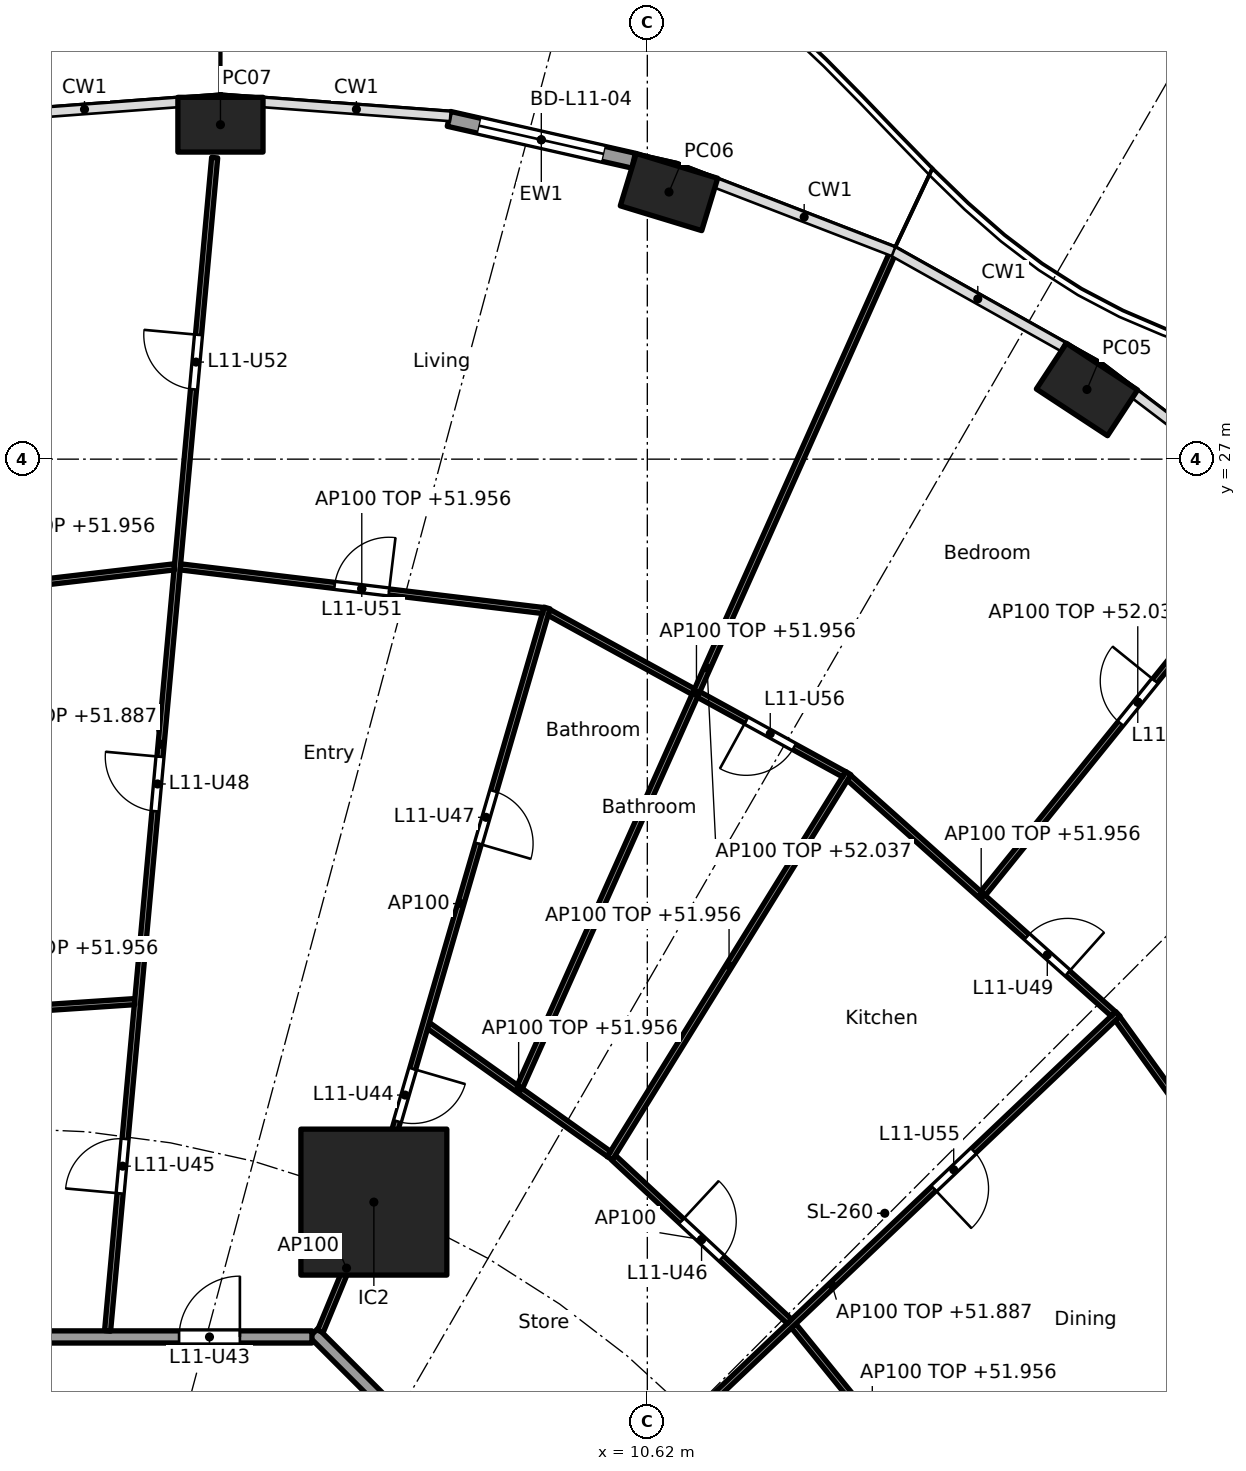
"""IFC4 building model, lengths in metres.
Left out: names, types, materials, properties, quantities, classifications, styles, units other than length and angle.
Written with IfcOpenShell. Run it as: python <this file> out.ifc"""

import sys

from ifc_helpers import new_model, si_unit, direction, frame, frame_2d, origin, origin_2d, place, context, subcontext, project, spatial, rectangle, hollow_rectangle, extrude, element, fill, save


model = new_model("IFC4")
c1 = context("Model", 3, precision=1e-05, world=origin(), true_north=direction((0.0, 1.0)))
c2 = subcontext(c1, "Body", "Model", "MODEL_VIEW")
j1 = project(units=[si_unit("LENGTHUNIT", "METRE"), si_unit("PLANEANGLEUNIT", "RADIAN")], contexts=[c1])
p1 = place(None, origin())
s1 = spatial("IfcSite", under=j1, at=p1, CompositionType="ELEMENT")
p2 = place(p1, origin())
s2 = spatial("IfcBuilding", under=s1, at=p2, CompositionType="ELEMENT")
p3 = place(p2, frame((0.0, 0.0, 49.2)))
s3 = spatial("IfcBuildingStorey", under=s2, at=p3, CompositionType="ELEMENT", Elevation=49.2)
for number, where, z_axis, x_axis in (
    (1, (17.85, 28.146, 0.0), (0.0, 0.0, 1.0), (-0.836, 0.549, 0.0)),
    (2, (10.976, 31.393, 0.0), (0.0, 0.0, 1.0), (-0.957, 0.292, 0.0)),
    (3, (3.6, 32.5, 0.0), (0.0, 0.0, 1.0), (-1.0, 0.0, 0.0)),
):
    element("IfcColumn", number, at=place(p3, frame(where, z_axis=z_axis, x_axis=x_axis)), inside=s3, PredefinedType="COLUMN", context=c2, shape_type="SweptSolid", body=[
        extrude(hollow_rectangle(XDim=1.4, YDim=0.9, WallThickness=0.05, at=origin_2d()), origin(), (0.0, 0.0, 1.0), 3.7),
    ])
p4 = place(p3, frame((6.123, 14.782, 0.0), z_axis=(0.0, 0.0, 1.0), x_axis=(1.0, 0.0, 0.0)))
e4 = element("IfcColumn", 4, at=p4, inside=s3, PredefinedType="COLUMN", context=c2, shape_type="SweptSolid", body=[
    extrude(rectangle(XDim=2.4, YDim=2.4, at=origin_2d()), origin(), (0.0, 0.0, 1.0), 3.7),
])
p5 = place(p3, frame((7.358, 32.596, 0.0), z_axis=(0.0, 0.0, 1.0), x_axis=(0.97533495413, -0.220729987208, 0.0)))
e5 = element("IfcWall", 5, at=p5, inside=s3, PredefinedType="SOLIDWALL", context=c2, shape_type="SweptSolid", body=[
    extrude(rectangle(XDim=3.115, YDim=0.25, at=frame_2d((1.557, 0.0))), origin(), (0.0, 0.0, 1.0), 3.44),
])
p6 = place(p5, frame((0.507, 0.0, 0.0)))
e6 = element("IfcOpeningElement", 6, at=p6, cuts=e5, PredefinedType="OPENING", context=c2, shape_type="SweptSolid", body=[
    extrude(rectangle(XDim=2.1, YDim=2.4, at=frame_2d((1.05, 1.2))), frame((0.0, 0.135, 0.0), z_axis=(0.0, -1.0, 0.0), x_axis=(1.0, 0.0, 0.0)), (0.0, 0.0, 1.0), 0.27),
])
p7 = place(p3, frame((12.635, 5.134, 0.0), z_axis=(0.0, 0.0, 1.0), x_axis=(-0.707106781187, 0.707106781187, 0.0)))
e7 = element("IfcWall", 7, at=p7, inside=s3, PredefinedType="PARTITIONING", context=c2, shape_type="SweptSolid", body=[
    extrude(rectangle(XDim=10.609, YDim=0.2, at=frame_2d((5.305, 0.0))), origin(), (0.0, 0.0, 1.0), 3.44),
])
p8 = place(p3, frame((5.104, 12.565, 0.0), z_axis=(0.0, 0.0, 1.0), x_axis=(-1.0, 0.0, 0.0)))
e8 = element("IfcWall", 8, at=p8, inside=s3, PredefinedType="PARTITIONING", context=c2, shape_type="SweptSolid", body=[
    extrude(rectangle(XDim=10.409, YDim=0.2, at=frame_2d((5.205, 0.0))), origin(), (0.0, 0.0, 1.0), 3.44),
])
p9 = place(p8, frame((1.185, 0.0, 0.0)))
e9 = element("IfcOpeningElement", 9, at=p9, cuts=e8, PredefinedType="OPENING", context=c2, shape_type="SweptSolid", body=[
    extrude(rectangle(XDim=1.0, YDim=2.1, at=frame_2d((0.5, 1.05))), frame((0.0, 0.11, 0.0), z_axis=(0.0, -1.0, 0.0), x_axis=(1.0, 0.0, 0.0)), (0.0, 0.0, 1.0), 0.22),
])
p10 = place(p3, frame((15.614, 9.559, 0.0), z_axis=(0.0, 0.0, 1.0), x_axis=(-0.63012473344, 0.776493928056, 0.0)))
e10 = element("IfcWall", 10, at=p10, inside=s3, PredefinedType="PARTITIONING", context=c2, shape_type="SweptSolid", body=[
    extrude(rectangle(XDim=4.106, YDim=0.1, at=frame_2d((2.053, 0.0))), origin(), (0.0, 0.0, 1.0), 2.756),
])
p11 = place(p3, frame((21.908, 12.866, 0.0), z_axis=(0.0, 0.0, 1.0), x_axis=(-0.584558392935, 0.811351640936, 0.0)))
e11 = element("IfcWall", 11, at=p11, inside=s3, PredefinedType="PARTITIONING", context=c2, shape_type="SweptSolid", body=[
    extrude(rectangle(XDim=6.084, YDim=0.1, at=frame_2d((3.042, 0.0))), origin(), (0.0, 0.0, 1.0), 2.756),
])
p12 = place(p3, frame((8.957, 8.953, 0.0), z_axis=(0.0, 0.0, 1.0), x_axis=(0.725250022034, 0.688485588476, 0.0)))
e12 = element("IfcWall", 12, at=p12, inside=s3, PredefinedType="PARTITIONING", context=c2, shape_type="SweptSolid", body=[
    extrude(rectangle(XDim=12.963, YDim=0.1, at=frame_2d((6.481, 0.0))), origin(), (0.0, 0.0, 1.0), 2.687),
])
p13 = place(p12, frame((2.333, 0.0, 0.0)))
e13 = element("IfcOpeningElement", 13, at=p13, cuts=e12, PredefinedType="OPENING", context=c2, shape_type="SweptSolid", body=[
    extrude(rectangle(XDim=0.9, YDim=2.1, at=frame_2d((0.45, 1.05))), frame((0.0, 0.06, 0.0), z_axis=(0.0, -1.0, 0.0), x_axis=(1.0, 0.0, 0.0)), (0.0, 0.0, 1.0), 0.12),
])
p14 = place(p12, frame((8.79, 0.0, 0.0)))
e14 = element("IfcOpeningElement", 14, at=p14, cuts=e12, PredefinedType="OPENING", context=c2, shape_type="SweptSolid", body=[
    extrude(rectangle(XDim=0.9, YDim=2.1, at=frame_2d((0.45, 1.05))), frame((0.0, 0.06, 0.0), z_axis=(0.0, -1.0, 0.0), x_axis=(1.0, 0.0, 0.0)), (0.0, 0.0, 1.0), 0.12),
])
p15 = place(p3, frame((12.958, 12.82, 0.0), z_axis=(0.0, 0.0, 1.0), x_axis=(-0.732022571638, 0.681280378855, 0.0)))
e15 = element("IfcWall", 15, at=p15, inside=s3, PredefinedType="PARTITIONING", context=c2, shape_type="SweptSolid", body=[
    extrude(rectangle(XDim=3.95, YDim=0.1, at=frame_2d((1.975, 0.0))), origin(), (0.0, 0.0, 1.0), 3.44),
])
p16 = place(p15, frame((1.525, 0.0, 0.0)))
e16 = element("IfcOpeningElement", 16, at=p16, cuts=e15, PredefinedType="OPENING", context=c2, shape_type="SweptSolid", body=[
    extrude(rectangle(XDim=0.9, YDim=2.1, at=frame_2d((0.45, 1.05))), frame((0.0, 0.06, 0.0), z_axis=(0.0, -1.0, 0.0), x_axis=(1.0, 0.0, 0.0)), (0.0, 0.0, 1.0), 0.12),
])
p17 = place(p3, frame((18.285, 17.877, 0.0), z_axis=(0.0, 0.0, 1.0), x_axis=(-0.745806142791, 0.666163041136, 0.0)))
e17 = element("IfcWall", 17, at=p17, inside=s3, PredefinedType="PARTITIONING", context=c2, shape_type="SweptSolid", body=[
    extrude(rectangle(XDim=5.831, YDim=0.1, at=frame_2d((2.915, 0.0))), origin(), (0.0, 0.0, 1.0), 2.756),
])
p18 = place(p17, frame((1.008, 0.0, 0.0)))
e18 = element("IfcOpeningElement", 18, at=p18, cuts=e17, PredefinedType="OPENING", context=c2, shape_type="SweptSolid", body=[
    extrude(rectangle(XDim=0.9, YDim=2.1, at=frame_2d((0.45, 1.05))), frame((0.0, 0.06, 0.0), z_axis=(0.0, -1.0, 0.0), x_axis=(1.0, 0.0, 0.0)), (0.0, 0.0, 1.0), 0.12),
])
p19 = place(p3, frame((16.142, 19.858, 0.0), z_axis=(0.0, 0.0, 1.0), x_axis=(0.628738066508, 0.777617157555, 0.0)))
e19 = element("IfcWall", 19, at=p19, inside=s3, PredefinedType="PARTITIONING", context=c2, shape_type="SweptSolid", body=[
    extrude(rectangle(XDim=8.091, YDim=0.1, at=frame_2d((4.045, 0.0))), origin(), (0.0, 0.0, 1.0), 2.837),
])
p20 = place(p19, frame((3.595, 0.0, 0.0)))
e20 = element("IfcOpeningElement", 20, at=p20, cuts=e19, PredefinedType="OPENING", context=c2, shape_type="SweptSolid", body=[
    extrude(rectangle(XDim=0.9, YDim=2.1, at=frame_2d((0.45, 1.05))), frame((0.0, 0.06, 0.0), z_axis=(0.0, -1.0, 0.0), x_axis=(1.0, 0.0, 0.0)), (0.0, 0.0, 1.0), 0.12),
])
p21 = place(p3, frame((10.003, 15.503, 0.0), z_axis=(0.0, 0.0, 1.0), x_axis=(0.52645953022, 0.850200189979, 0.0)))
e21 = element("IfcWall", 21, at=p21, inside=s3, PredefinedType="PARTITIONING", context=c2, shape_type="SweptSolid", body=[
    extrude(rectangle(XDim=7.45, YDim=0.1, at=frame_2d((3.725, 0.0))), origin(), (0.0, 0.0, 1.0), 2.756),
])
p22 = place(p3, frame((9.989, 15.574, 0.0), z_axis=(0.0, 0.0, 1.0), x_axis=(-0.81494477814, 0.57953861699, 0.0)))
e22 = element("IfcWall", 22, at=p22, inside=s3, PredefinedType="PARTITIONING", context=c2, shape_type="SweptSolid", body=[
    extrude(rectangle(XDim=3.644, YDim=0.1, at=frame_2d((1.822, 0.0))), origin(), (0.0, 0.0, 1.0), 2.756),
])
p23 = place(p3, frame((13.855, 21.818, 0.0), z_axis=(0.0, 0.0, 1.0), x_axis=(-0.876794415294, 0.480865421203, 0.0)))
e23 = element("IfcWall", 23, at=p23, inside=s3, PredefinedType="PARTITIONING", context=c2, shape_type="SweptSolid", body=[
    extrude(rectangle(XDim=5.536, YDim=0.1, at=frame_2d((2.768, 0.0))), origin(), (0.0, 0.0, 1.0), 2.756),
])
p24 = place(p23, frame((0.934, 0.0, 0.0)))
e24 = element("IfcOpeningElement", 24, at=p24, cuts=e23, PredefinedType="OPENING", context=c2, shape_type="SweptSolid", body=[
    extrude(rectangle(XDim=0.9, YDim=2.1, at=frame_2d((0.45, 1.05))), frame((0.0, 0.06, 0.0), z_axis=(0.0, -1.0, 0.0), x_axis=(1.0, 0.0, 0.0)), (0.0, 0.0, 1.0), 0.12),
])
p25 = place(p3, frame((8.524, 16.676, 0.0), z_axis=(0.0, 0.0, 1.0), x_axis=(0.408065177262, 0.912952797852, 0.0)))
e25 = element("IfcWall", 25, at=p25, inside=s3, PredefinedType="PARTITIONING", context=c2, shape_type="SweptSolid", body=[
    extrude(rectangle(XDim=15.089, YDim=0.1, at=frame_2d((7.544, 0.0))), origin(), (0.0, 0.0, 1.0), 2.837),
])
p26 = place(p3, frame((5.243, 12.657, 0.0), z_axis=(0.0, 0.0, 1.0), x_axis=(0.382719158442, 0.923864733477, 0.0)))
e26 = element("IfcWall", 26, at=p26, inside=s3, PredefinedType="PARTITIONING", context=c2, shape_type="SweptSolid", body=[
    extrude(rectangle(XDim=2.25, YDim=0.1, at=frame_2d((1.125, 0.0))), origin(), (0.0, 0.0, 1.0), 3.44),
])
p27 = place(p3, frame((6.137, 14.83, 0.0), z_axis=(0.0, 0.0, 1.0), x_axis=(0.279843546189, 0.960045618529, 0.0)))
e27 = element("IfcWall", 27, at=p27, inside=s3, PredefinedType="PARTITIONING", context=c2, shape_type="SweptSolid", body=[
    extrude(rectangle(XDim=10.127, YDim=0.1, at=frame_2d((5.063, 0.0))), origin(), (0.0, 0.0, 1.0), 3.44),
])
p28 = place(p27, frame((1.334, 0.0, 0.0)))
e28 = element("IfcOpeningElement", 28, at=p28, cuts=e27, PredefinedType="OPENING", context=c2, shape_type="SweptSolid", body=[
    extrude(rectangle(XDim=0.9, YDim=2.1, at=frame_2d((0.45, 1.05))), frame((0.0, 0.06, 0.0), z_axis=(0.0, -1.0, 0.0), x_axis=(1.0, 0.0, 0.0)), (0.0, 0.0, 1.0), 0.12),
])
p29 = place(p27, frame((6.091, 0.0, 0.0)))
e29 = element("IfcOpeningElement", 29, at=p29, cuts=e27, PredefinedType="OPENING", context=c2, shape_type="SweptSolid", body=[
    extrude(rectangle(XDim=0.9, YDim=2.1, at=frame_2d((0.45, 1.05))), frame((0.0, 0.06, 0.0), z_axis=(0.0, -1.0, 0.0), x_axis=(1.0, 0.0, 0.0)), (0.0, 0.0, 1.0), 0.12),
])
p30 = place(p3, frame((8.907, 24.51, 0.0), z_axis=(0.0, 0.0, 1.0), x_axis=(-0.992836798252, 0.119478416615, 0.0)))
e30 = element("IfcWall", 30, at=p30, inside=s3, PredefinedType="PARTITIONING", context=c2, shape_type="SweptSolid", body=[
    extrude(rectangle(XDim=6.01, YDim=0.1, at=frame_2d((3.005, 0.0))), origin(), (0.0, 0.0, 1.0), 2.756),
])
p31 = place(p30, frame((2.555, 0.0, 0.0)))
e31 = element("IfcOpeningElement", 31, at=p31, cuts=e30, PredefinedType="OPENING", context=c2, shape_type="SweptSolid", body=[
    extrude(rectangle(XDim=0.9, YDim=2.1, at=frame_2d((0.45, 1.05))), frame((0.0, 0.06, 0.0), z_axis=(0.0, -1.0, 0.0), x_axis=(1.0, 0.0, 0.0)), (0.0, 0.0, 1.0), 0.12),
])
p32 = place(p3, frame((1.744, 12.664, 0.0), z_axis=(0.0, 0.0, 1.0), x_axis=(0.090893639596, 0.995860605849, 0.0)))
e32 = element("IfcWall", 32, at=p32, inside=s3, PredefinedType="PARTITIONING", context=c2, shape_type="SweptSolid", body=[
    extrude(rectangle(XDim=19.374, YDim=0.1, at=frame_2d((9.687, 0.0))), origin(), (0.0, 0.0, 1.0), 2.687),
])
p33 = place(p32, frame((2.27, 0.0, 0.0)))
e33 = element("IfcOpeningElement", 33, at=p33, cuts=e32, PredefinedType="OPENING", context=c2, shape_type="SweptSolid", body=[
    extrude(rectangle(XDim=0.9, YDim=2.1, at=frame_2d((0.45, 1.05))), frame((0.0, 0.06, 0.0), z_axis=(0.0, -1.0, 0.0), x_axis=(1.0, 0.0, 0.0)), (0.0, 0.0, 1.0), 0.12),
])
p34 = place(p32, frame((8.582, 0.0, 0.0)))
e34 = element("IfcOpeningElement", 34, at=p34, cuts=e32, PredefinedType="OPENING", context=c2, shape_type="SweptSolid", body=[
    extrude(rectangle(XDim=0.9, YDim=2.1, at=frame_2d((0.45, 1.05))), frame((0.0, 0.06, 0.0), z_axis=(0.0, -1.0, 0.0), x_axis=(1.0, 0.0, 0.0)), (0.0, 0.0, 1.0), 0.12),
])
p35 = place(p32, frame((15.548, 0.0, 0.0)))
e35 = element("IfcOpeningElement", 35, at=p35, cuts=e32, PredefinedType="OPENING", context=c2, shape_type="SweptSolid", body=[
    extrude(rectangle(XDim=0.9, YDim=2.1, at=frame_2d((0.45, 1.05))), frame((0.0, 0.06, 0.0), z_axis=(0.0, -1.0, 0.0), x_axis=(1.0, 0.0, 0.0)), (0.0, 0.0, 1.0), 0.12),
])
p36 = place(p3, frame((2.188, 18.079, 0.0), z_axis=(0.0, 0.0, 1.0), x_axis=(-0.997791437766, -0.066424744789, 0.0)))
e36 = element("IfcWall", 36, at=p36, inside=s3, PredefinedType="PARTITIONING", context=c2, shape_type="SweptSolid", body=[
    extrude(rectangle(XDim=4.469, YDim=0.1, at=frame_2d((2.235, 0.0))), origin(), (0.0, 0.0, 1.0), 2.756),
])
p37 = place(p3, frame((2.842, 25.229, 0.0), z_axis=(0.0, 0.0, 1.0), x_axis=(-0.993255612046, -0.115945198862, 0.0)))
e37 = element("IfcWall", 37, at=p37, inside=s3, PredefinedType="PARTITIONING", context=c2, shape_type="SweptSolid", body=[
    extrude(rectangle(XDim=5.913, YDim=0.1, at=frame_2d((2.956, 0.0))), origin(), (0.0, 0.0, 1.0), 2.756),
])
p38 = place(p6, origin())
e38 = element("IfcDoor", 38, at=p38, inside=s3, OperationType="SLIDING_TO_LEFT", PredefinedType="DOOR", context=c2, shape_type="SweptSolid", body=[
    extrude(rectangle(XDim=2.1, YDim=2.4, at=frame_2d((1.05, 1.2))), frame((0.0, 0.025, 0.0), z_axis=(0.0, -1.0, 0.0), x_axis=(1.0, 0.0, 0.0)), (0.0, 0.0, 1.0), 0.05),
])
fill(e6, e38)
p39 = place(p9, frame((1.0, 0.0, 0.0), x_axis=(-1.0, 0.0, 0.0)))
e39 = element("IfcDoor", 39, at=p39, inside=s3, OperationType="SINGLE_SWING_RIGHT", PredefinedType="DOOR", context=c2, shape_type="SweptSolid", body=[
    extrude(rectangle(XDim=1.0, YDim=2.1, at=frame_2d((0.5, 1.05))), frame((0.0, 0.025, 0.0), z_axis=(0.0, -1.0, 0.0), x_axis=(1.0, 0.0, 0.0)), (0.0, 0.0, 1.0), 0.05),
])
fill(e9, e39)
p40 = place(p28, frame((0.9, 0.0, 0.0), x_axis=(-1.0, 0.0, 0.0)))
e40 = element("IfcDoor", 40, at=p40, inside=s3, OperationType="SINGLE_SWING_LEFT", PredefinedType="DOOR", context=c2, shape_type="SweptSolid", body=[
    extrude(rectangle(XDim=0.9, YDim=2.1, at=frame_2d((0.45, 1.05))), frame((0.0, 0.025, 0.0), z_axis=(0.0, -1.0, 0.0), x_axis=(1.0, 0.0, 0.0)), (0.0, 0.0, 1.0), 0.05),
])
fill(e28, e40)
p41 = place(p33, origin())
e41 = element("IfcDoor", 41, at=p41, inside=s3, OperationType="SINGLE_SWING_LEFT", PredefinedType="DOOR", context=c2, shape_type="SweptSolid", body=[
    extrude(rectangle(XDim=0.9, YDim=2.1, at=frame_2d((0.45, 1.05))), frame((0.0, 0.025, 0.0), z_axis=(0.0, -1.0, 0.0), x_axis=(1.0, 0.0, 0.0)), (0.0, 0.0, 1.0), 0.05),
])
fill(e33, e41)
p42 = place(p16, frame((0.9, 0.0, 0.0), x_axis=(-1.0, 0.0, 0.0)))
e42 = element("IfcDoor", 42, at=p42, inside=s3, OperationType="SINGLE_SWING_LEFT", PredefinedType="DOOR", context=c2, shape_type="SweptSolid", body=[
    extrude(rectangle(XDim=0.9, YDim=2.1, at=frame_2d((0.45, 1.05))), frame((0.0, 0.025, 0.0), z_axis=(0.0, -1.0, 0.0), x_axis=(1.0, 0.0, 0.0)), (0.0, 0.0, 1.0), 0.05),
])
fill(e16, e42)
p43 = place(p29, frame((0.9, 0.0, 0.0), x_axis=(-1.0, 0.0, 0.0)))
e43 = element("IfcDoor", 43, at=p43, inside=s3, OperationType="SINGLE_SWING_RIGHT", PredefinedType="DOOR", context=c2, shape_type="SweptSolid", body=[
    extrude(rectangle(XDim=0.9, YDim=2.1, at=frame_2d((0.45, 1.05))), frame((0.0, 0.025, 0.0), z_axis=(0.0, -1.0, 0.0), x_axis=(1.0, 0.0, 0.0)), (0.0, 0.0, 1.0), 0.05),
])
fill(e29, e43)
p44 = place(p34, origin())
e44 = element("IfcDoor", 44, at=p44, inside=s3, OperationType="SINGLE_SWING_RIGHT", PredefinedType="DOOR", context=c2, shape_type="SweptSolid", body=[
    extrude(rectangle(XDim=0.9, YDim=2.1, at=frame_2d((0.45, 1.05))), frame((0.0, 0.025, 0.0), z_axis=(0.0, -1.0, 0.0), x_axis=(1.0, 0.0, 0.0)), (0.0, 0.0, 1.0), 0.05),
])
fill(e34, e44)
p45 = place(p18, frame((0.9, 0.0, 0.0), x_axis=(-1.0, 0.0, 0.0)))
e45 = element("IfcDoor", 45, at=p45, inside=s3, OperationType="SINGLE_SWING_RIGHT", PredefinedType="DOOR", context=c2, shape_type="SweptSolid", body=[
    extrude(rectangle(XDim=0.9, YDim=2.1, at=frame_2d((0.45, 1.05))), frame((0.0, 0.025, 0.0), z_axis=(0.0, -1.0, 0.0), x_axis=(1.0, 0.0, 0.0)), (0.0, 0.0, 1.0), 0.05),
])
fill(e18, e45)
p46 = place(p20, origin())
e46 = element("IfcDoor", 46, at=p46, inside=s3, OperationType="SINGLE_SWING_RIGHT", PredefinedType="DOOR", context=c2, shape_type="SweptSolid", body=[
    extrude(rectangle(XDim=0.9, YDim=2.1, at=frame_2d((0.45, 1.05))), frame((0.0, 0.025, 0.0), z_axis=(0.0, -1.0, 0.0), x_axis=(1.0, 0.0, 0.0)), (0.0, 0.0, 1.0), 0.05),
])
fill(e20, e46)
p47 = place(p31, frame((0.9, 0.0, 0.0), x_axis=(-1.0, 0.0, 0.0)))
e47 = element("IfcDoor", 47, at=p47, inside=s3, OperationType="SINGLE_SWING_RIGHT", PredefinedType="DOOR", context=c2, shape_type="SweptSolid", body=[
    extrude(rectangle(XDim=0.9, YDim=2.1, at=frame_2d((0.45, 1.05))), frame((0.0, 0.025, 0.0), z_axis=(0.0, -1.0, 0.0), x_axis=(1.0, 0.0, 0.0)), (0.0, 0.0, 1.0), 0.05),
])
fill(e31, e47)
p48 = place(p35, origin())
e48 = element("IfcDoor", 48, at=p48, inside=s3, OperationType="SINGLE_SWING_RIGHT", PredefinedType="DOOR", context=c2, shape_type="SweptSolid", body=[
    extrude(rectangle(XDim=0.9, YDim=2.1, at=frame_2d((0.45, 1.05))), frame((0.0, 0.025, 0.0), z_axis=(0.0, -1.0, 0.0), x_axis=(1.0, 0.0, 0.0)), (0.0, 0.0, 1.0), 0.05),
])
fill(e35, e48)
p49 = place(p14, frame((0.9, 0.0, 0.0), x_axis=(-1.0, 0.0, 0.0)))
e49 = element("IfcDoor", 49, at=p49, inside=s3, OperationType="SINGLE_SWING_RIGHT", PredefinedType="DOOR", context=c2, shape_type="SweptSolid", body=[
    extrude(rectangle(XDim=0.9, YDim=2.1, at=frame_2d((0.45, 1.05))), frame((0.0, 0.025, 0.0), z_axis=(0.0, -1.0, 0.0), x_axis=(1.0, 0.0, 0.0)), (0.0, 0.0, 1.0), 0.05),
])
fill(e14, e49)
p50 = place(p24, origin())
e50 = element("IfcDoor", 50, at=p50, inside=s3, OperationType="SINGLE_SWING_RIGHT", PredefinedType="DOOR", context=c2, shape_type="SweptSolid", body=[
    extrude(rectangle(XDim=0.9, YDim=2.1, at=frame_2d((0.45, 1.05))), frame((0.0, 0.025, 0.0), z_axis=(0.0, -1.0, 0.0), x_axis=(1.0, 0.0, 0.0)), (0.0, 0.0, 1.0), 0.05),
])
fill(e24, e50)
save(model, sys.argv[1])
